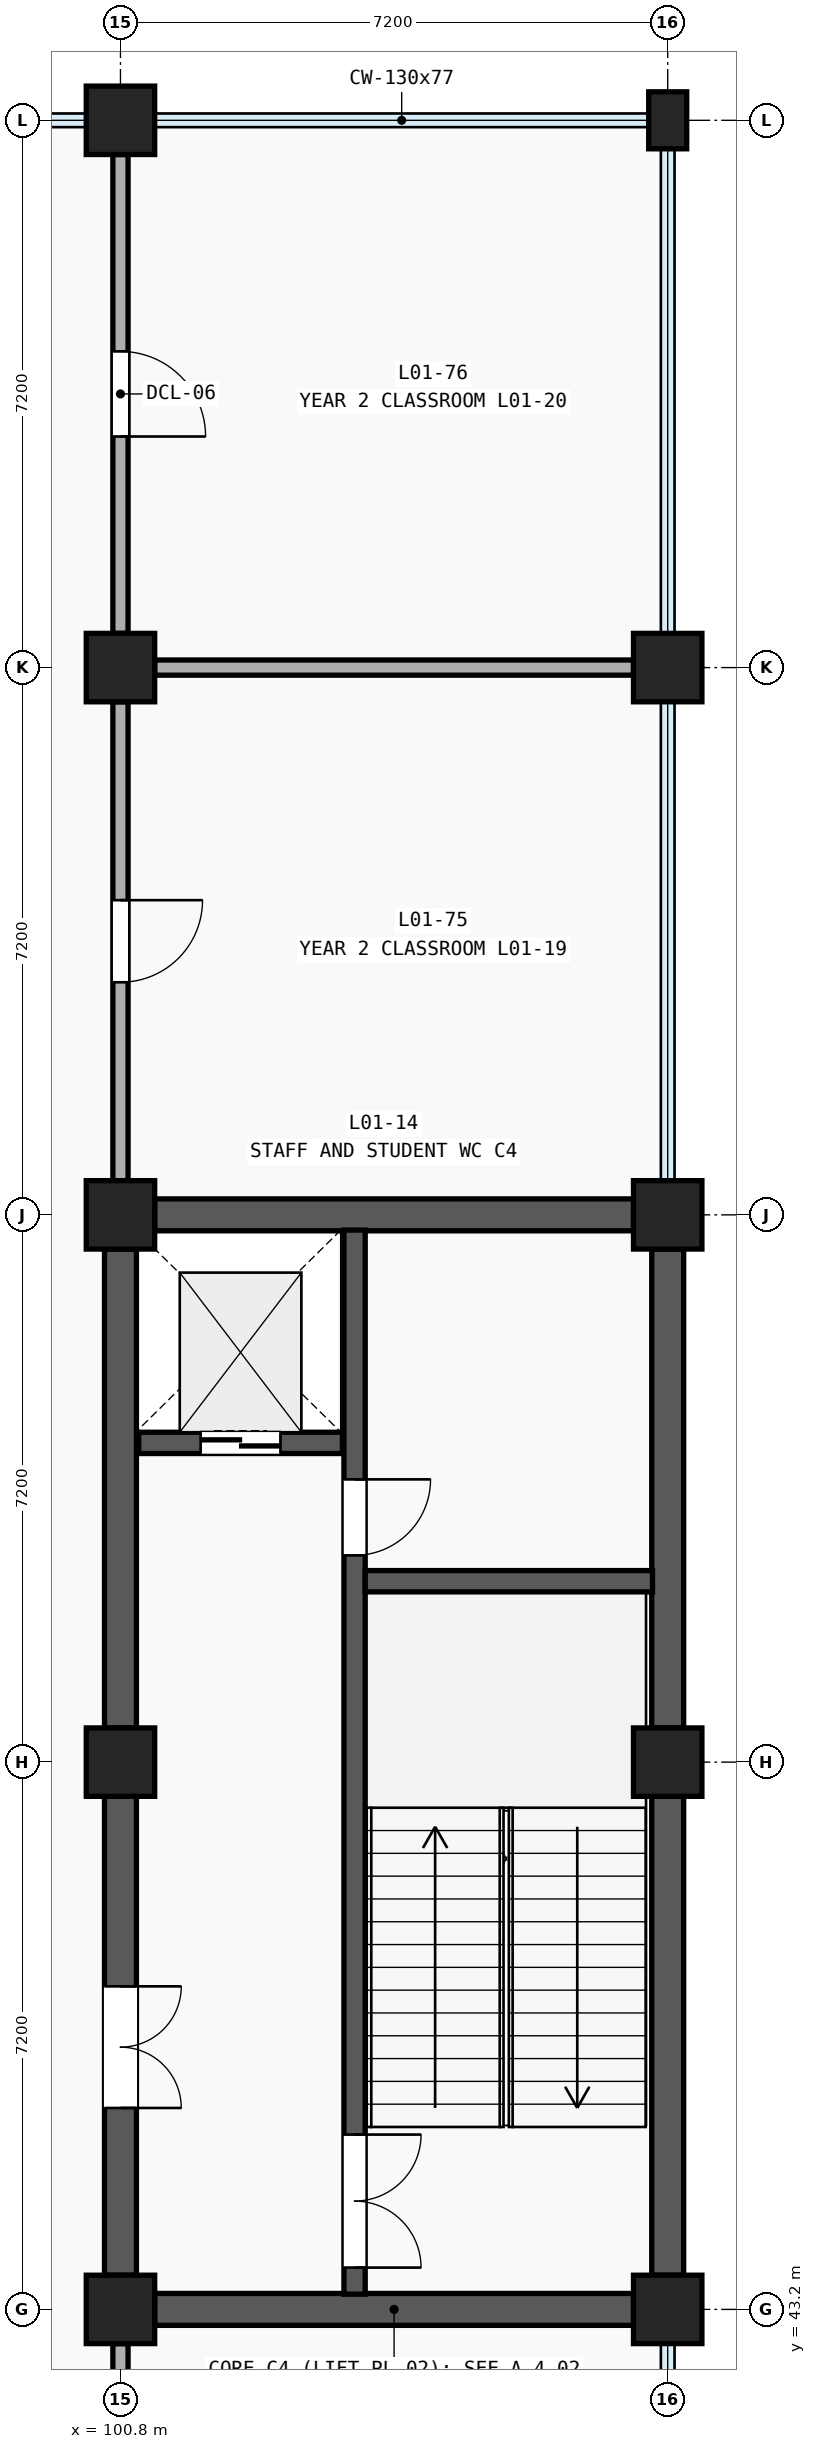
"""IFC4 building model, lengths in metres.
Left out: names, types, materials, properties, quantities, classifications, styles, units other than length and angle.
Written with IfcOpenShell. Run it as: python <this file> out.ifc"""

import sys

from ifc_helpers import new_model, si_unit, direction, frame, frame_2d, origin, origin_2d, place, context, subcontext, project, spatial, rectangle, extrude, element, fill, save


model = new_model("IFC4")
c1 = context("Model", 3, precision=1e-05, world=origin(), true_north=direction((0.0, 1.0)))
c2 = subcontext(c1, "Body", "Model", "MODEL_VIEW")
j1 = project(units=[si_unit("LENGTHUNIT", "METRE"), si_unit("PLANEANGLEUNIT", "RADIAN")], contexts=[c1])
p1 = place(None, origin())
s1 = spatial("IfcSite", under=j1, at=p1, CompositionType="ELEMENT")
p2 = place(p1, origin())
s2 = spatial("IfcBuilding", under=s1, at=p2, CompositionType="ELEMENT")
p3 = place(p2, frame((0.0, 0.0, 4.8)))
s3 = spatial("IfcBuildingStorey", under=s2, at=p3, CompositionType="ELEMENT", Elevation=4.8)
for number, where, z_axis, x_axis in (
    (1, (100.8, 43.2, 0.0), (0.0, 0.0, 1.0), (1.0, 0.0, 0.0)),
    (2, (100.8, 50.4, 0.0), (0.0, 0.0, 1.0), (1.0, 0.0, 0.0)),
    (3, (100.8, 57.6, 0.0), (0.0, 0.0, 1.0), (1.0, 0.0, 0.0)),
    (4, (100.8, 64.8, 0.0), (0.0, 0.0, 1.0), (1.0, 0.0, 0.0)),
    (5, (100.8, 72.0, 0.0), (0.0, 0.0, 1.0), (1.0, 0.0, 0.0)),
    (6, (108.0, 43.2, 0.0), (0.0, 0.0, 1.0), (1.0, 0.0, 0.0)),
    (7, (108.0, 50.4, 0.0), (0.0, 0.0, 1.0), (1.0, 0.0, 0.0)),
    (8, (108.0, 57.6, 0.0), (0.0, 0.0, 1.0), (1.0, 0.0, 0.0)),
    (9, (108.0, 64.8, 0.0), (0.0, 0.0, 1.0), (1.0, 0.0, 0.0)),
):
    element("IfcColumn", number, at=place(p3, frame(where, z_axis=z_axis, x_axis=x_axis)), inside=s3, PredefinedType="COLUMN", context=c2, shape_type="SweptSolid", body=[
        extrude(rectangle(XDim=0.9, YDim=0.9, at=origin_2d()), origin(), (0.0, 0.0, 1.0), 4.8),
    ])
p4 = place(p3, frame((108.0, 72.0, 0.0), z_axis=(0.0, 0.0, 1.0), x_axis=(1.0, 0.0, 0.0)))
e10 = element("IfcColumn", 10, at=p4, inside=s3, PredefinedType="PILASTER", context=c2, shape_type="SweptSolid", body=[
    extrude(rectangle(XDim=0.5, YDim=0.75, at=origin_2d()), origin(), (0.0, 0.0, 1.0), 4.8),
])
p5 = place(p3, frame((100.8, 43.65, 0.0), z_axis=(0.0, 0.0, 1.0), x_axis=(0.0, 1.0, 0.0)))
e11 = element("IfcWall", 11, at=p5, inside=s3, PredefinedType="SHEAR", context=c2, shape_type="SweptSolid", body=[
    extrude(rectangle(XDim=6.3, YDim=0.42, at=frame_2d((3.15, 0.0))), origin(), (0.0, 0.0, 1.0), 3.58),
])
p6 = place(p5, frame((2.2, 0.0, 0.0)))
e12 = element("IfcOpeningElement", 12, at=p6, cuts=e11, PredefinedType="OPENING", context=c2, shape_type="SweptSolid", body=[
    extrude(rectangle(XDim=1.6, YDim=2.2, at=frame_2d((0.8, 1.1))), frame((0.0, 0.222, 0.0), z_axis=(0.0, -1.0, 0.0), x_axis=(1.0, 0.0, 0.0)), (0.0, 0.0, 1.0), 0.444),
])
p7 = place(p3, frame((100.8, 50.85, 0.0), z_axis=(0.0, 0.0, 1.0), x_axis=(0.0, 1.0, 0.0)))
e13 = element("IfcWall", 13, at=p7, inside=s3, PredefinedType="SHEAR", context=c2, shape_type="SweptSolid", body=[
    extrude(rectangle(XDim=6.3, YDim=0.42, at=frame_2d((3.15, 0.0))), origin(), (0.0, 0.0, 1.0), 3.58),
])
p8 = place(p3, frame((108.0, 43.65, 0.0), z_axis=(0.0, 0.0, 1.0), x_axis=(0.0, 1.0, 0.0)))
e14 = element("IfcWall", 14, at=p8, inside=s3, PredefinedType="SHEAR", context=c2, shape_type="SweptSolid", body=[
    extrude(rectangle(XDim=6.3, YDim=0.42, at=frame_2d((3.15, 0.0))), origin(), (0.0, 0.0, 1.0), 3.85),
])
p9 = place(p3, frame((108.0, 50.85, 0.0), z_axis=(0.0, 0.0, 1.0), x_axis=(0.0, 1.0, 0.0)))
e15 = element("IfcWall", 15, at=p9, inside=s3, PredefinedType="SHEAR", context=c2, shape_type="SweptSolid", body=[
    extrude(rectangle(XDim=6.3, YDim=0.42, at=frame_2d((3.15, 0.0))), origin(), (0.0, 0.0, 1.0), 3.85),
])
for number, where, z_axis, x_axis in (
    (16, (101.25, 43.2, 0.0), (0.0, 0.0, 1.0), (1.0, 0.0, 0.0)),
    (17, (101.25, 57.6, 0.0), (0.0, 0.0, 1.0), (1.0, 0.0, 0.0)),
):
    element("IfcWall", number, at=place(p3, frame(where, z_axis=z_axis, x_axis=x_axis)), inside=s3, PredefinedType="SHEAR", context=c2, shape_type="SweptSolid", body=[
        extrude(rectangle(XDim=6.3, YDim=0.42, at=frame_2d((3.15, 0.0))), origin(), (0.0, 0.0, 1.0), 3.58),
    ])
p10 = place(p3, frame((103.88, 43.4, 0.0), z_axis=(0.0, 0.0, 1.0), x_axis=(0.0, 1.0, 0.0)))
e18 = element("IfcWall", 18, at=p10, inside=s3, PredefinedType="SHEAR", context=c2, shape_type="SweptSolid", body=[
    extrude(rectangle(XDim=14.0, YDim=0.28, at=frame_2d((7.0, 0.0))), origin(), (0.0, 0.0, 1.0), 4.48),
])
p11 = place(p10, frame((0.35, 0.0, 0.0)))
e19 = element("IfcOpeningElement", 19, at=p11, cuts=e18, PredefinedType="OPENING", context=c2, shape_type="SweptSolid", body=[
    extrude(rectangle(XDim=1.75, YDim=2.15, at=frame_2d((0.875, 1.075))), frame((0.0, 0.152, 0.0), z_axis=(0.0, -1.0, 0.0), x_axis=(1.0, 0.0, 0.0)), (0.0, 0.0, 1.0), 0.304),
])
p12 = place(p10, frame((9.72, 0.0, 0.0)))
e20 = element("IfcOpeningElement", 20, at=p12, cuts=e18, PredefinedType="OPENING", context=c2, shape_type="SweptSolid", body=[
    extrude(rectangle(XDim=1.0, YDim=2.15, at=frame_2d((0.5, 1.075))), frame((0.0, 0.152, 0.0), z_axis=(0.0, -1.0, 0.0), x_axis=(1.0, 0.0, 0.0)), (0.0, 0.0, 1.0), 0.304),
])
p13 = place(p3, frame((104.02, 52.78, 0.0), z_axis=(0.0, 0.0, 1.0), x_axis=(1.0, 0.0, 0.0)))
e21 = element("IfcWall", 21, at=p13, inside=s3, PredefinedType="SHEAR", context=c2, shape_type="SweptSolid", body=[
    extrude(rectangle(XDim=3.78, YDim=0.28, at=frame_2d((1.89, 0.0))), origin(), (0.0, 0.0, 1.0), 4.48),
])
p14 = place(p3, frame((101.04, 54.6, 0.0), z_axis=(0.0, 0.0, 1.0), x_axis=(1.0, 0.0, 0.0)))
e22 = element("IfcWall", 22, at=p14, inside=s3, PredefinedType="SHEAR", context=c2, shape_type="SweptSolid", body=[
    extrude(rectangle(XDim=2.68, YDim=0.28, at=frame_2d((1.34, 0.0))), origin(), (0.0, 0.0, 1.0), 4.48),
])
p15 = place(p14, frame((0.815, 0.0, 0.0)))
e23 = element("IfcOpeningElement", 23, at=p15, cuts=e22, PredefinedType="OPENING", context=c2, shape_type="SweptSolid", body=[
    extrude(rectangle(XDim=1.05, YDim=2.2, at=frame_2d((0.525, 1.1))), frame((0.0, 0.152, 0.0), z_axis=(0.0, -1.0, 0.0), x_axis=(1.0, 0.0, 0.0)), (0.0, 0.0, 1.0), 0.304),
])
p16 = place(p3, frame((100.8, 36.45, 0.0), z_axis=(0.0, 0.0, 1.0), x_axis=(0.0, 1.0, 0.0)))
e24 = element("IfcWall", 24, at=p16, inside=s3, PredefinedType="PARTITIONING", context=c2, shape_type="SweptSolid", body=[
    extrude(rectangle(XDim=6.3, YDim=0.2, at=frame_2d((3.15, 0.0))), origin(), (0.0, 0.0, 1.0), 3.58),
])
p17 = place(p16, frame((2.62, 0.0, 0.0)))
e25 = element("IfcOpeningElement", 25, at=p17, cuts=e24, PredefinedType="OPENING", context=c2, shape_type="SweptSolid", body=[
    extrude(rectangle(XDim=1.06, YDim=2.16, at=frame_2d((0.53, 1.08))), frame((0.0, 0.112, 0.0), z_axis=(0.0, -1.0, 0.0), x_axis=(1.0, 0.0, 0.0)), (0.0, 0.0, 1.0), 0.224),
])
p18 = place(p3, frame((101.25, 64.8, 0.0), z_axis=(0.0, 0.0, 1.0), x_axis=(1.0, 0.0, 0.0)))
e26 = element("IfcWall", 26, at=p18, inside=s3, PredefinedType="PARTITIONING", context=c2, shape_type="SweptSolid", body=[
    extrude(rectangle(XDim=6.3, YDim=0.2, at=frame_2d((3.15, 0.0))), origin(), (0.0, 0.0, 1.0), 3.58),
])
p19 = place(p3, frame((100.8, 58.05, 0.0), z_axis=(0.0, 0.0, 1.0), x_axis=(0.0, 1.0, 0.0)))
e27 = element("IfcWall", 27, at=p19, inside=s3, PredefinedType="PARTITIONING", context=c2, shape_type="SweptSolid", body=[
    extrude(rectangle(XDim=6.3, YDim=0.2, at=frame_2d((3.15, 0.0))), origin(), (0.0, 0.0, 1.0), 3.58),
])
p20 = place(p19, frame((2.61, 0.0, 0.0)))
e28 = element("IfcOpeningElement", 28, at=p20, cuts=e27, PredefinedType="OPENING", context=c2, shape_type="SweptSolid", body=[
    extrude(rectangle(XDim=1.08, YDim=2.18, at=frame_2d((0.54, 1.09))), frame((0.0, 0.112, 0.0), z_axis=(0.0, -1.0, 0.0), x_axis=(1.0, 0.0, 0.0)), (0.0, 0.0, 1.0), 0.224),
])
p21 = place(p3, frame((100.8, 65.25, 0.0), z_axis=(0.0, 0.0, 1.0), x_axis=(0.0, 1.0, 0.0)))
e29 = element("IfcWall", 29, at=p21, inside=s3, PredefinedType="PARTITIONING", context=c2, shape_type="SweptSolid", body=[
    extrude(rectangle(XDim=6.3, YDim=0.2, at=frame_2d((3.15, 0.0))), origin(), (0.0, 0.0, 1.0), 3.58),
])
p22 = place(p21, frame((2.59, 0.0, 0.0)))
e30 = element("IfcOpeningElement", 30, at=p22, cuts=e29, PredefinedType="OPENING", context=c2, shape_type="SweptSolid", body=[
    extrude(rectangle(XDim=1.12, YDim=2.2, at=frame_2d((0.56, 1.1))), frame((0.0, 0.112, 0.0), z_axis=(0.0, -1.0, 0.0), x_axis=(1.0, 0.0, 0.0)), (0.0, 0.0, 1.0), 0.224),
])
p23 = place(p6, frame((1.6, 0.0, 0.0), z_axis=(0.0, 0.0, 1.0), x_axis=(-1.0, 0.0, 0.0)))
e31 = element("IfcDoor", 31, at=p23, inside=s3, OperationType="DOUBLE_DOOR_SINGLE_SWING", PredefinedType="DOOR", context=c2, shape_type="SweptSolid", body=[
    extrude(rectangle(XDim=1.6, YDim=2.2, at=frame_2d((0.8, 1.1))), frame((0.0, 0.025, 0.0), z_axis=(0.0, -1.0, 0.0), x_axis=(1.0, 0.0, 0.0)), (0.0, 0.0, 1.0), 0.05),
])
fill(e12, e31)
p24 = place(p11, frame((1.75, 0.0, 0.0), z_axis=(0.0, 0.0, 1.0), x_axis=(-1.0, 0.0, 0.0)))
e32 = element("IfcDoor", 32, at=p24, inside=s3, OperationType="DOUBLE_DOOR_SINGLE_SWING", PredefinedType="DOOR", context=c2, shape_type="SweptSolid", body=[
    extrude(rectangle(XDim=1.75, YDim=2.15, at=frame_2d((0.875, 1.075))), frame((0.0, 0.025, 0.0), z_axis=(0.0, -1.0, 0.0), x_axis=(1.0, 0.0, 0.0)), (0.0, 0.0, 1.0), 0.05),
])
fill(e19, e32)
p25 = place(p12, frame((1.0, 0.0, 0.0), z_axis=(0.0, 0.0, 1.0), x_axis=(-1.0, 0.0, 0.0)))
e33 = element("IfcDoor", 33, at=p25, inside=s3, OperationType="SINGLE_SWING_LEFT", PredefinedType="DOOR", context=c2, shape_type="SweptSolid", body=[
    extrude(rectangle(XDim=1.0, YDim=2.15, at=frame_2d((0.5, 1.075))), frame((0.0, 0.025, 0.0), z_axis=(0.0, -1.0, 0.0), x_axis=(1.0, 0.0, 0.0)), (0.0, 0.0, 1.0), 0.05),
])
fill(e20, e33)
p26 = place(p15, frame((1.05, 0.0, 0.0), z_axis=(0.0, 0.0, 1.0), x_axis=(-1.0, 0.0, 0.0)))
e34 = element("IfcDoor", 34, at=p26, inside=s3, OperationType="DOUBLE_DOOR_SLIDING", PredefinedType="DOOR", context=c2, shape_type="SweptSolid", body=[
    extrude(rectangle(XDim=1.05, YDim=2.2, at=frame_2d((0.525, 1.1))), frame((0.0, 0.025, 0.0), z_axis=(0.0, -1.0, 0.0), x_axis=(1.0, 0.0, 0.0)), (0.0, 0.0, 1.0), 0.05),
])
fill(e23, e34)
p27 = place(p20, frame((1.08, 0.0, 0.0), z_axis=(0.0, 0.0, 1.0), x_axis=(-1.0, 0.0, 0.0)))
e35 = element("IfcDoor", 35, at=p27, inside=s3, OperationType="SINGLE_SWING_LEFT", PredefinedType="DOOR", context=c2, shape_type="SweptSolid", body=[
    extrude(rectangle(XDim=1.08, YDim=2.18, at=frame_2d((0.54, 1.09))), frame((0.0, 0.025, 0.0), z_axis=(0.0, -1.0, 0.0), x_axis=(1.0, 0.0, 0.0)), (0.0, 0.0, 1.0), 0.05),
])
fill(e28, e35)
p28 = place(p22, frame((1.12, 0.0, 0.0), z_axis=(0.0, 0.0, 1.0), x_axis=(-1.0, 0.0, 0.0)))
e36 = element("IfcDoor", 36, at=p28, inside=s3, OperationType="SINGLE_SWING_RIGHT", PredefinedType="DOOR", context=c2, shape_type="SweptSolid", body=[
    extrude(rectangle(XDim=1.12, YDim=2.2, at=frame_2d((0.56, 1.1))), frame((0.0, 0.025, 0.0), z_axis=(0.0, -1.0, 0.0), x_axis=(1.0, 0.0, 0.0)), (0.0, 0.0, 1.0), 0.05),
])
fill(e30, e36)
save(model, sys.argv[1])
